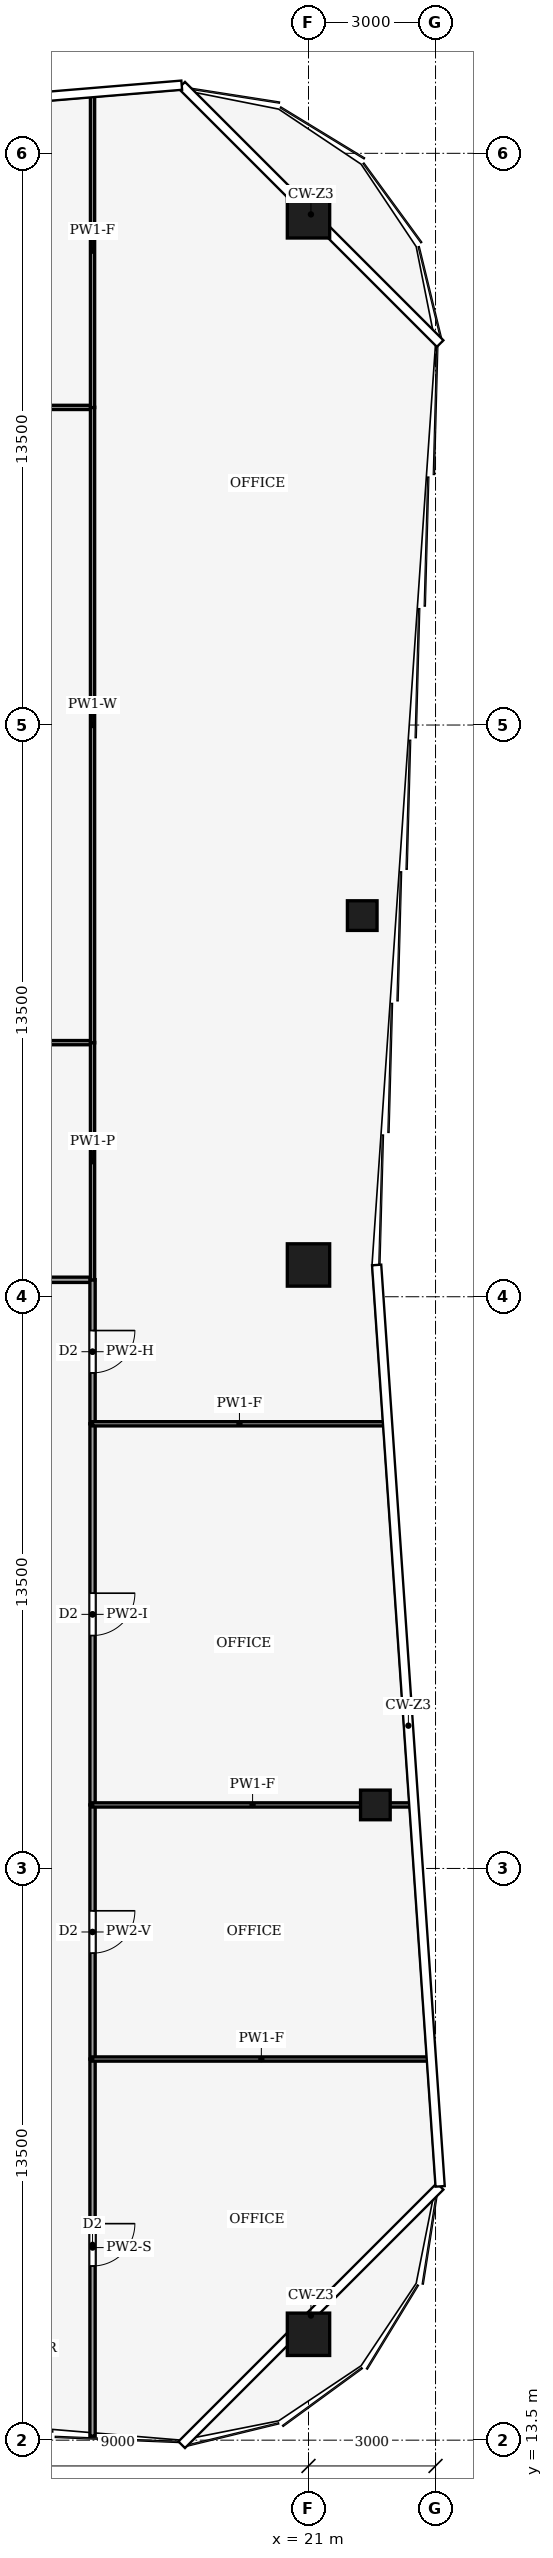
"""IFC4 building model, lengths in metres.
Left out: names, types, materials, properties, quantities, classifications, styles, units other than length and angle.
Written with IfcOpenShell. Run it as: python <this file> out.ifc"""

import sys

from ifc_helpers import new_model, si_unit, direction, frame, frame_2d, origin, origin_2d, place, context, subcontext, project, spatial, rectangle, hollow_rectangle, extrude, element, fill, save


model = new_model("IFC4")
c1 = context("Model", 3, precision=1e-05, world=origin(), true_north=direction((0.0, 1.0)))
c2 = subcontext(c1, "Body", "Model", "MODEL_VIEW")
j1 = project(units=[si_unit("LENGTHUNIT", "METRE"), si_unit("PLANEANGLEUNIT", "RADIAN")], contexts=[c1])
p1 = place(None, origin())
s1 = spatial("IfcSite", under=j1, at=p1, CompositionType="ELEMENT")
p2 = place(p1, origin())
s2 = spatial("IfcBuilding", under=s1, at=p2, CompositionType="ELEMENT")
p3 = place(p2, frame((0.0, 0.0, 202.0)))
s3 = spatial("IfcBuildingStorey", under=s2, at=p3, CompositionType="ELEMENT", Elevation=202.0)
for number, where, z_axis, x_axis in (
    (1, (21.0, 66.0, 0.0), (0.0, 0.0, 1.0), (1.0, 0.0, 0.0)),
    (2, (21.0, 41.25, 0.0), (0.0, 0.0, 1.0), (1.0, 0.0, 0.0)),
    (3, (21.0, 16.0, 0.0), (0.0, 0.0, 1.0), (1.0, 0.0, 0.0)),
):
    element("IfcColumn", number, at=place(p3, frame(where, z_axis=z_axis, x_axis=x_axis)), inside=s3, PredefinedType="COLUMN", context=c2, shape_type="SweptSolid", body=[
        extrude(hollow_rectangle(XDim=1.0, YDim=1.0, WallThickness=0.06, at=origin_2d()), origin(), (0.0, 0.0, 1.0), 4.0),
    ])
for number, where, z_axis, x_axis in (
    (4, (22.579, 28.5, 0.0), (0.0, 0.0, 1.0), (1.0, 0.0, 0.0)),
    (5, (22.269, 49.5, 0.0), (0.0, 0.0, 1.0), (1.0, 0.0, 0.0)),
):
    element("IfcColumn", number, at=place(p3, frame(where, z_axis=z_axis, x_axis=x_axis)), inside=s3, PredefinedType="COLUMN", context=c2, shape_type="SweptSolid", body=[
        extrude(hollow_rectangle(XDim=0.7, YDim=0.7, WallThickness=0.03, at=origin_2d()), origin(), (0.0, 0.0, 1.0), 4.0),
    ])
p4 = place(p3, frame((9.0, 40.9, 0.0), z_axis=(0.0, 0.0, 1.0), x_axis=(1.0, 0.0, 0.0)))
e6 = element("IfcWall", 6, at=p4, inside=s3, PredefinedType="PARTITIONING", context=c2, shape_type="SweptSolid", body=[
    extrude(rectangle(XDim=6.9, YDim=0.125, at=frame_2d((3.45, 0.0))), origin(), (0.0, 0.0, 1.0), 3.44),
])
p5 = place(p4, frame((2.95, 0.0, 0.0)))
e7 = element("IfcOpeningElement", 7, at=p5, cuts=e6, PredefinedType="OPENING", context=c2, shape_type="SweptSolid", body=[
    extrude(rectangle(XDim=1.0, YDim=2.1, at=frame_2d((0.5, 1.05))), frame((0.0, 0.073, 0.0), z_axis=(0.0, -1.0, 0.0), x_axis=(1.0, 0.0, 0.0)), (0.0, 0.0, 1.0), 0.145),
])
p6 = place(p3, frame((15.9, 22.5, 0.0), z_axis=(0.0, 0.0, 1.0), x_axis=(0.0, -1.0, 0.0)))
e8 = element("IfcWall", 8, at=p6, inside=s3, PredefinedType="PARTITIONING", context=c2, shape_type="SweptSolid", body=[
    extrude(rectangle(XDim=8.905, YDim=0.125, at=frame_2d((4.453, 0.0))), origin(), (0.0, 0.0, 1.0), 3.04),
])
p7 = place(p6, frame((3.887, 0.0, 0.0)))
e9 = element("IfcOpeningElement", 9, at=p7, cuts=e8, PredefinedType="OPENING", context=c2, shape_type="SweptSolid", body=[
    extrude(rectangle(XDim=1.0, YDim=2.1, at=frame_2d((0.5, 1.05))), frame((0.0, 0.073, 0.0), z_axis=(0.0, -1.0, 0.0), x_axis=(1.0, 0.0, 0.0)), (0.0, 0.0, 1.0), 0.145),
])
p8 = place(p3, frame((15.9, 28.5, 0.0), z_axis=(0.0, 0.0, 1.0), x_axis=(0.0, -1.0, 0.0)))
e10 = element("IfcWall", 10, at=p8, inside=s3, PredefinedType="PARTITIONING", context=c2, shape_type="SweptSolid", body=[
    extrude(rectangle(XDim=6.0, YDim=0.125, at=frame_2d((3.0, 0.0))), origin(), (0.0, 0.0, 1.0), 3.44),
])
p9 = place(p8, frame((2.5, 0.0, 0.0)))
e11 = element("IfcOpeningElement", 11, at=p9, cuts=e10, PredefinedType="OPENING", context=c2, shape_type="SweptSolid", body=[
    extrude(rectangle(XDim=1.0, YDim=2.1, at=frame_2d((0.5, 1.05))), frame((0.0, 0.073, 0.0), z_axis=(0.0, -1.0, 0.0), x_axis=(1.0, 0.0, 0.0)), (0.0, 0.0, 1.0), 0.145),
])
p10 = place(p3, frame((15.9, 37.5, 0.0), z_axis=(0.0, 0.0, 1.0), x_axis=(0.0, -1.0, 0.0)))
e12 = element("IfcWall", 12, at=p10, inside=s3, PredefinedType="PARTITIONING", context=c2, shape_type="SweptSolid", body=[
    extrude(rectangle(XDim=9.0, YDim=0.125, at=frame_2d((4.5, 0.0))), origin(), (0.0, 0.0, 1.0), 3.48),
])
p11 = place(p10, frame((4.0, 0.0, 0.0)))
e13 = element("IfcOpeningElement", 13, at=p11, cuts=e12, PredefinedType="OPENING", context=c2, shape_type="SweptSolid", body=[
    extrude(rectangle(XDim=1.0, YDim=2.1, at=frame_2d((0.5, 1.05))), frame((0.0, 0.073, 0.0), z_axis=(0.0, -1.0, 0.0), x_axis=(1.0, 0.0, 0.0)), (0.0, 0.0, 1.0), 0.145),
])
p12 = place(p3, frame((15.9, 40.904, 0.0), z_axis=(0.0, 0.0, 1.0), x_axis=(0.0, -1.0, 0.0)))
e14 = element("IfcWall", 14, at=p12, inside=s3, PredefinedType="PARTITIONING", context=c2, shape_type="SweptSolid", body=[
    extrude(rectangle(XDim=3.404, YDim=0.125, at=frame_2d((1.702, 0.0))), origin(), (0.0, 0.0, 1.0), 3.14),
])
p13 = place(p12, frame((1.202, 0.0, 0.0)))
e15 = element("IfcOpeningElement", 15, at=p13, cuts=e14, PredefinedType="OPENING", context=c2, shape_type="SweptSolid", body=[
    extrude(rectangle(XDim=1.0, YDim=2.1, at=frame_2d((0.5, 1.05))), frame((0.0, 0.073, 0.0), z_axis=(0.0, -1.0, 0.0), x_axis=(1.0, 0.0, 0.0)), (0.0, 0.0, 1.0), 0.145),
])
p14 = place(p3, frame((15.9, 46.5, 0.0), z_axis=(0.0, 0.0, 1.0), x_axis=(-1.0, 0.0, 0.0)))
e16 = element("IfcWall", 16, at=p14, inside=s3, PredefinedType="PARTITIONING", context=c2, shape_type="SweptSolid", body=[
    extrude(rectangle(XDim=6.904, YDim=0.1, at=frame_2d((3.452, 0.0))), origin(), (0.0, 0.0, 1.0), 3.44),
])
p15 = place(p3, frame((15.9, 40.896, 0.0), z_axis=(0.0, 0.0, 1.0), x_axis=(0.0, 1.0, 0.0)))
e17 = element("IfcWall", 17, at=p15, inside=s3, PredefinedType="PARTITIONING", context=c2, shape_type="SweptSolid", body=[
    extrude(rectangle(XDim=5.608, YDim=0.1, at=frame_2d((2.804, 0.0))), origin(), (0.0, 0.0, 1.0), 3.44),
])
p16 = place(p3, frame((9.0, 61.5, 0.0), z_axis=(0.0, 0.0, 1.0), x_axis=(1.0, 0.0, 0.0)))
e18 = element("IfcWall", 18, at=p16, inside=s3, PredefinedType="PARTITIONING", context=c2, shape_type="SweptSolid", body=[
    extrude(rectangle(XDim=6.9, YDim=0.1, at=frame_2d((3.45, 0.0))), origin(), (0.0, 0.0, 1.0), 3.24),
])
p17 = place(p16, frame((2.95, 0.0, 0.0)))
e19 = element("IfcOpeningElement", 19, at=p17, cuts=e18, PredefinedType="OPENING", context=c2, shape_type="SweptSolid", body=[
    extrude(rectangle(XDim=1.0, YDim=2.1, at=frame_2d((0.5, 1.05))), frame((0.0, 0.06, 0.0), z_axis=(0.0, -1.0, 0.0), x_axis=(1.0, 0.0, 0.0)), (0.0, 0.0, 1.0), 0.12),
])
p18 = place(p3, frame((15.9, 46.496, 0.0), z_axis=(0.0, 0.0, 1.0), x_axis=(0.0, 1.0, 0.0)))
e20 = element("IfcWall", 20, at=p18, inside=s3, PredefinedType="PARTITIONING", context=c2, shape_type="SweptSolid", body=[
    extrude(rectangle(XDim=15.008, YDim=0.1, at=frame_2d((7.504, 0.0))), origin(), (0.0, 0.0, 1.0), 3.24),
])
p19 = place(p3, frame((15.9, 61.496, 0.0), z_axis=(0.0, 0.0, 1.0), x_axis=(0.0, 1.0, 0.0)))
e21 = element("IfcWall", 21, at=p19, inside=s3, PredefinedType="PARTITIONING", context=c2, shape_type="SweptSolid", body=[
    extrude(rectangle(XDim=7.409, YDim=0.1, at=frame_2d((3.705, 0.0))), origin(), (0.0, 0.0, 1.0), 3.04),
])
p20 = place(p3, frame((23.873, 22.5, 0.0), z_axis=(0.0, 0.0, 1.0), x_axis=(-1.0, 0.0, 0.0)))
e22 = element("IfcWall", 22, at=p20, inside=s3, PredefinedType="PARTITIONING", context=c2, shape_type="SweptSolid", body=[
    extrude(rectangle(XDim=7.973, YDim=0.1, at=frame_2d((3.987, 0.0))), origin(), (0.0, 0.0, 1.0), 3.04),
])
p21 = place(p3, frame((23.459, 28.5, 0.0), z_axis=(0.0, 0.0, 1.0), x_axis=(-1.0, 0.0, 0.0)))
e23 = element("IfcWall", 23, at=p21, inside=s3, PredefinedType="PARTITIONING", context=c2, shape_type="SweptSolid", body=[
    extrude(rectangle(XDim=7.559, YDim=0.1, at=frame_2d((3.78, 0.0))), origin(), (0.0, 0.0, 1.0), 3.04),
])
p22 = place(p3, frame((22.839, 37.5, 0.0), z_axis=(0.0, 0.0, 1.0), x_axis=(-1.0, 0.0, 0.0)))
e24 = element("IfcWall", 24, at=p22, inside=s3, PredefinedType="PARTITIONING", context=c2, shape_type="SweptSolid", body=[
    extrude(rectangle(XDim=6.939, YDim=0.1, at=frame_2d((3.469, 0.0))), origin(), (0.0, 0.0, 1.0), 3.04),
])
p23 = place(p7, origin())
e25 = element("IfcDoor", 25, at=p23, inside=s3, OperationType="SINGLE_SWING_LEFT", PredefinedType="DOOR", context=c2, shape_type="SweptSolid", body=[
    extrude(rectangle(XDim=1.0, YDim=2.1, at=frame_2d((0.5, 1.05))), frame((0.0, 0.025, 0.0), z_axis=(0.0, -1.0, 0.0), x_axis=(1.0, 0.0, 0.0)), (0.0, 0.0, 1.0), 0.05),
])
fill(e9, e25)
p24 = place(p9, origin())
e26 = element("IfcDoor", 26, at=p24, inside=s3, OperationType="SINGLE_SWING_LEFT", PredefinedType="DOOR", context=c2, shape_type="SweptSolid", body=[
    extrude(rectangle(XDim=1.0, YDim=2.1, at=frame_2d((0.5, 1.05))), frame((0.0, 0.025, 0.0), z_axis=(0.0, -1.0, 0.0), x_axis=(1.0, 0.0, 0.0)), (0.0, 0.0, 1.0), 0.05),
])
fill(e11, e26)
p25 = place(p11, origin())
e27 = element("IfcDoor", 27, at=p25, inside=s3, OperationType="SINGLE_SWING_RIGHT", PredefinedType="DOOR", context=c2, shape_type="SweptSolid", body=[
    extrude(rectangle(XDim=1.0, YDim=2.1, at=frame_2d((0.5, 1.05))), frame((0.0, 0.025, 0.0), z_axis=(0.0, -1.0, 0.0), x_axis=(1.0, 0.0, 0.0)), (0.0, 0.0, 1.0), 0.05),
])
fill(e13, e27)
p26 = place(p13, origin())
e28 = element("IfcDoor", 28, at=p26, inside=s3, OperationType="SINGLE_SWING_LEFT", PredefinedType="DOOR", context=c2, shape_type="SweptSolid", body=[
    extrude(rectangle(XDim=1.0, YDim=2.1, at=frame_2d((0.5, 1.05))), frame((0.0, 0.025, 0.0), z_axis=(0.0, -1.0, 0.0), x_axis=(1.0, 0.0, 0.0)), (0.0, 0.0, 1.0), 0.05),
])
fill(e15, e28)
save(model, sys.argv[1])
